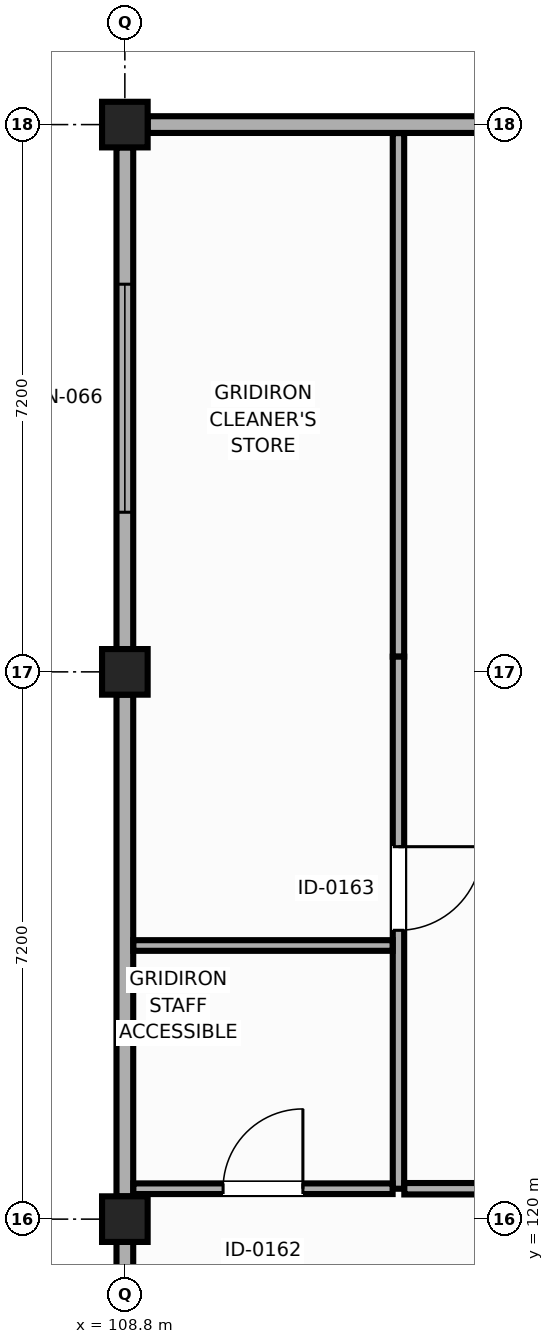
"""IFC4 building model, lengths in metres.
Left out: names, types, materials, properties, quantities, classifications, styles, units other than length and angle.
Written with IfcOpenShell. Run it as: python <this file> out.ifc"""

import sys

from ifc_helpers import new_model, si_unit, direction, frame, frame_2d, origin, origin_2d, place, context, subcontext, project, spatial, rectangle, extrude, element, fill, save


model = new_model("IFC4")
c1 = context("Model", 3, precision=1e-05, world=origin(), true_north=direction((0.0, 1.0)))
c2 = subcontext(c1, "Body", "Model", "MODEL_VIEW")
j1 = project(units=[si_unit("LENGTHUNIT", "METRE"), si_unit("PLANEANGLEUNIT", "RADIAN")], contexts=[c1])
p1 = place(None, origin())
s1 = spatial("IfcSite", under=j1, at=p1, CompositionType="ELEMENT")
p2 = place(p1, origin())
s2 = spatial("IfcBuilding", under=s1, at=p2, CompositionType="ELEMENT")
p3 = place(p2, frame((0.0, 0.0, 23.1)))
s3 = spatial("IfcBuildingStorey", under=s2, at=p3, CompositionType="ELEMENT", Elevation=23.1)
p4 = place(p3, frame((108.8, 120.0, 0.0), z_axis=(0.0, 0.0, 1.0), x_axis=(1.0, 0.0, 0.0)))
e1 = element("IfcColumn", 1, at=p4, inside=s3, PredefinedType="COLUMN", context=c2, shape_type="SweptSolid", body=[
    extrude(rectangle(XDim=0.6, YDim=0.6, at=origin_2d()), origin(), (0.0, 0.0, 1.0), 5.321),
])
p5 = place(p3, frame((108.8, 127.2, 0.0), z_axis=(0.0, 0.0, 1.0), x_axis=(1.0, 0.0, 0.0)))
e2 = element("IfcColumn", 2, at=p5, inside=s3, PredefinedType="COLUMN", context=c2, shape_type="SweptSolid", body=[
    extrude(rectangle(XDim=0.6, YDim=0.6, at=origin_2d()), origin(), (0.0, 0.0, 1.0), 6.596),
])
p6 = place(p3, frame((108.8, 134.4, 0.0), z_axis=(0.0, 0.0, 1.0), x_axis=(0.0, 1.0, 0.0)))
e3 = element("IfcColumn", 3, at=p6, inside=s3, PredefinedType="COLUMN", context=c2, shape_type="SweptSolid", body=[
    extrude(rectangle(XDim=0.6, YDim=0.6, at=origin_2d()), origin(), (0.0, 0.0, 1.0), 5.326),
])
p7 = place(p3, frame((108.8, 112.95, 0.0), z_axis=(0.0, 0.0, 1.0), x_axis=(0.0, 1.0, 0.0)))
e4 = element("IfcWall", 4, at=p7, inside=s3, PredefinedType="SOLIDWALL", context=c2, shape_type="SweptSolid", body=[
    extrude(rectangle(XDim=6.75, YDim=0.22, at=frame_2d((3.375, 0.0))), origin(), (0.0, 0.0, 1.0), 3.656),
])
p8 = place(p3, frame((108.8, 120.3, 0.0), z_axis=(0.0, 0.0, 1.0), x_axis=(0.0, 1.0, 0.0)))
e5 = element("IfcWall", 5, at=p8, inside=s3, PredefinedType="SOLIDWALL", context=c2, shape_type="SweptSolid", body=[
    extrude(rectangle(XDim=6.6, YDim=0.22, at=frame_2d((3.3, 0.0))), origin(), (0.0, 0.0, 1.0), 3.656),
])
p9 = place(p3, frame((108.8, 127.5, 0.0), z_axis=(0.0, 0.0, 1.0), x_axis=(0.0, 1.0, 0.0)))
e6 = element("IfcWall", 6, at=p9, inside=s3, PredefinedType="SOLIDWALL", context=c2, shape_type="SweptSolid", body=[
    extrude(rectangle(XDim=6.6, YDim=0.22, at=frame_2d((3.3, 0.0))), origin(), (0.0, 0.0, 1.0), 4.2),
])
p10 = place(p9, frame((1.8, 0.0, 1.8)))
e7 = element("IfcOpeningElement", 7, at=p10, cuts=e6, PredefinedType="OPENING", context=c2, shape_type="SweptSolid", body=[
    extrude(rectangle(XDim=3.0, YDim=1.2, at=frame_2d((1.5, 0.6))), frame((0.0, 0.12, 0.0), z_axis=(0.0, -1.0, 0.0), x_axis=(1.0, 0.0, 0.0)), (0.0, 0.0, 1.0), 0.24),
])
p11 = place(p3, frame((109.1, 134.4, 0.0), z_axis=(0.0, 0.0, 1.0), x_axis=(1.0, 0.0, 0.0)))
e8 = element("IfcWall", 8, at=p11, inside=s3, PredefinedType="SOLIDWALL", context=c2, shape_type="SweptSolid", body=[
    extrude(rectangle(XDim=6.6, YDim=0.22, at=frame_2d((3.3, 0.0))), origin(), (0.0, 0.0, 1.0), 4.2),
])
p12 = place(p3, frame((112.4, 134.288, 0.0), z_axis=(0.0, 0.0, 1.0), x_axis=(0.0, -1.0, 0.0)))
e9 = element("IfcWall", 9, at=p12, inside=s3, PredefinedType="PARTITIONING", context=c2, shape_type="SweptSolid", body=[
    extrude(rectangle(XDim=6.888, YDim=0.15, at=frame_2d((3.444, 0.0))), origin(), (0.0, 0.0, 1.0), 3.88),
])
p13 = place(p3, frame((112.4, 127.4, 0.0), z_axis=(0.0, 0.0, 1.0), x_axis=(0.0, -1.0, 0.0)))
e10 = element("IfcWall", 10, at=p13, inside=s3, PredefinedType="PARTITIONING", context=c2, shape_type="SweptSolid", body=[
    extrude(rectangle(XDim=7.0, YDim=0.15, at=frame_2d((3.5, 0.0))), origin(), (0.0, 0.0, 1.0), 3.88),
])
p14 = place(p13, frame((2.5, 0.0, 0.0)))
e11 = element("IfcOpeningElement", 11, at=p14, cuts=e10, PredefinedType="OPENING", context=c2, shape_type="SweptSolid", body=[
    extrude(rectangle(XDim=1.1, YDim=2.15, at=frame_2d((0.55, 1.075))), frame((0.0, 0.085, 0.0), z_axis=(0.0, -1.0, 0.0), x_axis=(1.0, 0.0, 0.0)), (0.0, 0.0, 1.0), 0.17),
])
p15 = place(p3, frame((112.477, 120.4, 0.0), z_axis=(0.0, 0.0, 1.0), x_axis=(1.0, 0.0, 0.0)))
e12 = element("IfcWall", 12, at=p15, inside=s3, PredefinedType="PARTITIONING", context=c2, shape_type="SweptSolid", body=[
    extrude(rectangle(XDim=8.323, YDim=0.15, at=frame_2d((4.162, 0.0))), origin(), (0.0, 0.0, 1.0), 3.88),
])
p16 = place(p3, frame((112.323, 123.6, 0.0), z_axis=(0.0, 0.0, 1.0), x_axis=(-1.0, 0.0, 0.0)))
e13 = element("IfcWall", 13, at=p16, inside=s3, PredefinedType="PARTITIONING", context=c2, shape_type="SweptSolid", body=[
    extrude(rectangle(XDim=3.411, YDim=0.14, at=frame_2d((1.706, 0.0))), origin(), (0.0, 0.0, 1.0), 3.88),
])
p17 = place(p3, frame((108.912, 120.4, 0.0), z_axis=(0.0, 0.0, 1.0), x_axis=(1.0, 0.0, 0.0)))
e14 = element("IfcWall", 14, at=p17, inside=s3, PredefinedType="PARTITIONING", context=c2, shape_type="SweptSolid", body=[
    extrude(rectangle(XDim=3.411, YDim=0.14, at=frame_2d((1.706, 0.0))), origin(), (0.0, 0.0, 1.0), 3.88),
])
p18 = place(p17, frame((1.18, 0.0, 0.0)))
e15 = element("IfcOpeningElement", 15, at=p18, cuts=e14, PredefinedType="OPENING", context=c2, shape_type="SweptSolid", body=[
    extrude(rectangle(XDim=1.05, YDim=2.12, at=frame_2d((0.525, 1.06))), frame((0.0, 0.08, 0.0), z_axis=(0.0, -1.0, 0.0), x_axis=(1.0, 0.0, 0.0)), (0.0, 0.0, 1.0), 0.16),
])
p19 = place(p10, origin())
e16 = element("IfcWindow", 16, at=p19, inside=s3, PartitioningType="SINGLE_PANEL", PredefinedType="WINDOW", context=c2, shape_type="SweptSolid", body=[
    extrude(rectangle(XDim=3.0, YDim=1.2, at=frame_2d((1.5, 0.6))), frame((0.0, 0.03, 0.0), z_axis=(0.0, -1.0, 0.0), x_axis=(1.0, 0.0, 0.0)), (0.0, 0.0, 1.0), 0.06),
])
fill(e7, e16)
p20 = place(p18, origin())
e17 = element("IfcDoor", 17, at=p20, inside=s3, OperationType="SINGLE_SWING_RIGHT", PredefinedType="DOOR", context=c2, shape_type="SweptSolid", body=[
    extrude(rectangle(XDim=1.05, YDim=2.12, at=frame_2d((0.525, 1.06))), frame((0.0, 0.025, 0.0), z_axis=(0.0, -1.0, 0.0), x_axis=(1.0, 0.0, 0.0)), (0.0, 0.0, 1.0), 0.05),
])
fill(e15, e17)
p21 = place(p14, origin())
e18 = element("IfcDoor", 18, at=p21, inside=s3, OperationType="SINGLE_SWING_LEFT", PredefinedType="DOOR", context=c2, shape_type="SweptSolid", body=[
    extrude(rectangle(XDim=1.1, YDim=2.15, at=frame_2d((0.55, 1.075))), frame((0.0, 0.025, 0.0), z_axis=(0.0, -1.0, 0.0), x_axis=(1.0, 0.0, 0.0)), (0.0, 0.0, 1.0), 0.05),
])
fill(e11, e18)
save(model, sys.argv[1])
